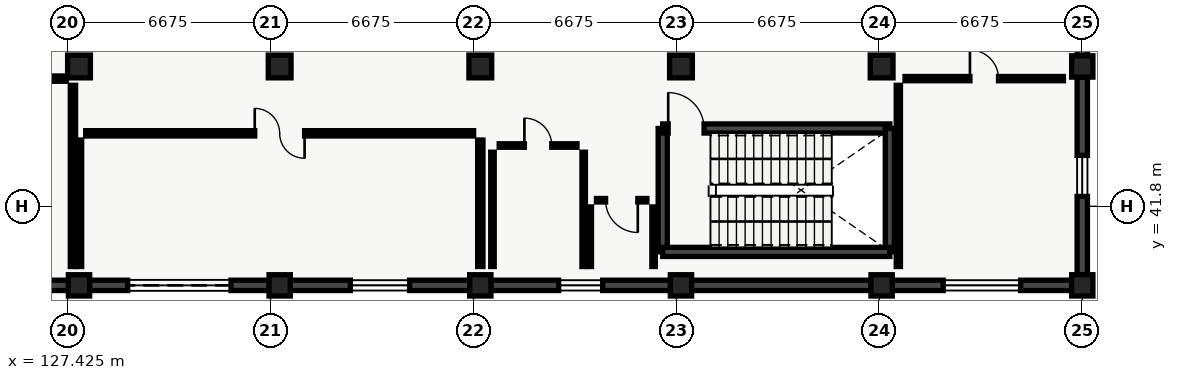
"""IFC4 building model, lengths in metres.
Left out: names, types, materials, properties, quantities, classifications, styles, units other than length and angle.
Written with IfcOpenShell. Run it as: python <this file> out.ifc"""

import sys

from ifc_helpers import new_model, si_unit, direction, frame, frame_2d, origin, origin_2d, place, context, subcontext, project, spatial, rectangle, extrude, element, fill, save


model = new_model("IFC4")
c1 = context("Model", 3, precision=1e-05, world=origin(), true_north=direction((0.0, 1.0)))
c2 = subcontext(c1, "Body", "Model", "MODEL_VIEW")
j1 = project(units=[si_unit("LENGTHUNIT", "METRE"), si_unit("PLANEANGLEUNIT", "RADIAN")], contexts=[c1])
p1 = place(None, origin())
s1 = spatial("IfcSite", under=j1, at=p1, CompositionType="ELEMENT")
p2 = place(p1, origin())
s2 = spatial("IfcBuilding", under=s1, at=p2, CompositionType="ELEMENT")
p3 = place(p2, origin())
s3 = spatial("IfcBuildingStorey", under=s2, at=p3, CompositionType="ELEMENT", Elevation=0.0)
p4 = place(p3, frame((127.8, 39.2, 0.0), z_axis=(0.0, 0.0, 1.0), x_axis=(1.0, 0.0, 0.0)))
e1 = element("IfcColumn", 1, at=p4, inside=s3, PredefinedType="COLUMN", context=c2, shape_type="SweptSolid", body=[
    extrude(rectangle(XDim=0.7, YDim=0.7, at=origin_2d()), origin(), (0.0, 0.0, 1.0), 4.9),
])
p5 = place(p3, frame((127.8, 46.4, 0.0), z_axis=(0.0, 0.0, 1.0), x_axis=(1.0, 0.0, 0.0)))
e2 = element("IfcColumn", 2, at=p5, inside=s3, PredefinedType="COLUMN", context=c2, shape_type="SweptSolid", body=[
    extrude(rectangle(XDim=0.75, YDim=0.75, at=origin_2d()), origin(), (0.0, 0.0, 1.0), 4.9),
])
p6 = place(p3, frame((134.4, 39.2, 0.0), z_axis=(0.0, 0.0, 1.0), x_axis=(1.0, 0.0, 0.0)))
e3 = element("IfcColumn", 3, at=p6, inside=s3, PredefinedType="COLUMN", context=c2, shape_type="SweptSolid", body=[
    extrude(rectangle(XDim=0.7, YDim=0.7, at=origin_2d()), origin(), (0.0, 0.0, 1.0), 4.9),
])
p7 = place(p3, frame((134.4, 46.4, 0.0), z_axis=(0.0, 0.0, 1.0), x_axis=(1.0, 0.0, 0.0)))
e4 = element("IfcColumn", 4, at=p7, inside=s3, PredefinedType="COLUMN", context=c2, shape_type="SweptSolid", body=[
    extrude(rectangle(XDim=0.75, YDim=0.75, at=origin_2d()), origin(), (0.0, 0.0, 1.0), 4.9),
])
p8 = place(p3, frame((141.0, 39.2, 0.0), z_axis=(0.0, 0.0, 1.0), x_axis=(1.0, 0.0, 0.0)))
e5 = element("IfcColumn", 5, at=p8, inside=s3, PredefinedType="COLUMN", context=c2, shape_type="SweptSolid", body=[
    extrude(rectangle(XDim=0.7, YDim=0.7, at=origin_2d()), origin(), (0.0, 0.0, 1.0), 4.9),
])
p9 = place(p3, frame((141.0, 46.4, 0.0), z_axis=(0.0, 0.0, 1.0), x_axis=(1.0, 0.0, 0.0)))
e6 = element("IfcColumn", 6, at=p9, inside=s3, PredefinedType="COLUMN", context=c2, shape_type="SweptSolid", body=[
    extrude(rectangle(XDim=0.75, YDim=0.75, at=origin_2d()), origin(), (0.0, 0.0, 1.0), 4.9),
])
p10 = place(p3, frame((147.6, 39.2, 0.0), z_axis=(0.0, 0.0, 1.0), x_axis=(1.0, 0.0, 0.0)))
e7 = element("IfcColumn", 7, at=p10, inside=s3, PredefinedType="COLUMN", context=c2, shape_type="SweptSolid", body=[
    extrude(rectangle(XDim=0.7, YDim=0.7, at=origin_2d()), origin(), (0.0, 0.0, 1.0), 4.9),
])
p11 = place(p3, frame((147.6, 46.4, 0.0), z_axis=(0.0, 0.0, 1.0), x_axis=(1.0, 0.0, 0.0)))
e8 = element("IfcColumn", 8, at=p11, inside=s3, PredefinedType="COLUMN", context=c2, shape_type="SweptSolid", body=[
    extrude(rectangle(XDim=0.75, YDim=0.75, at=origin_2d()), origin(), (0.0, 0.0, 1.0), 4.9),
])
p12 = place(p3, frame((154.2, 39.2, 0.0), z_axis=(0.0, 0.0, 1.0), x_axis=(1.0, 0.0, 0.0)))
e9 = element("IfcColumn", 9, at=p12, inside=s3, PredefinedType="COLUMN", context=c2, shape_type="SweptSolid", body=[
    extrude(rectangle(XDim=0.7, YDim=0.7, at=origin_2d()), origin(), (0.0, 0.0, 1.0), 4.9),
])
p13 = place(p3, frame((154.2, 46.4, 0.0), z_axis=(0.0, 0.0, 1.0), x_axis=(1.0, 0.0, 0.0)))
e10 = element("IfcColumn", 10, at=p13, inside=s3, PredefinedType="COLUMN", context=c2, shape_type="SweptSolid", body=[
    extrude(rectangle(XDim=0.75, YDim=0.75, at=origin_2d()), origin(), (0.0, 0.0, 1.0), 4.9),
])
for number, where, z_axis, x_axis in (
    (11, (160.8, 39.2, 0.0), (0.0, 0.0, 1.0), (1.0, 0.0, 0.0)),
    (12, (160.8, 46.4, 0.0), (0.0, 0.0, 1.0), (1.0, 0.0, 0.0)),
):
    element("IfcColumn", number, at=place(p3, frame(where, z_axis=z_axis, x_axis=x_axis)), inside=s3, PredefinedType="COLUMN", context=c2, shape_type="SweptSolid", body=[
        extrude(rectangle(XDim=0.7, YDim=0.7, at=origin_2d()), origin(), (0.0, 0.0, 1.0), 4.9),
    ])
p14 = place(p3, frame((160.8, 53.255, 0.0), z_axis=(0.0, 0.0, 1.0), x_axis=(0.0, -1.0, 0.0)))
e13 = element("IfcWall", 13, at=p14, inside=s3, PredefinedType="SOLIDWALL", context=c2, shape_type="SweptSolid", body=[
    extrude(rectangle(XDim=6.51, YDim=0.34, at=frame_2d((3.255, 0.0))), origin(), (0.0, 0.0, 1.0), 4.435),
])
p15 = place(p14, frame((4.06, 0.0, 0.0)))
e14 = element("IfcOpeningElement", 14, at=p15, cuts=e13, PredefinedType="OPENING", context=c2, shape_type="SweptSolid", body=[
    extrude(rectangle(XDim=2.0, YDim=2.25, at=frame_2d((1.0, 1.125))), frame((0.0, 0.17, 0.0), z_axis=(0.0, -1.0, 0.0), x_axis=(1.0, 0.0, 0.0)), (0.0, 0.0, 1.0), 0.34),
])
p16 = place(p3, frame((160.8, 46.055, 0.0), z_axis=(0.0, 0.0, 1.0), x_axis=(0.0, -1.0, 0.0)))
e15 = element("IfcWall", 15, at=p16, inside=s3, PredefinedType="SOLIDWALL", context=c2, shape_type="SweptSolid", body=[
    extrude(rectangle(XDim=6.51, YDim=0.34, at=frame_2d((3.255, 0.0))), origin(), (0.0, 0.0, 1.0), 4.435),
])
p17 = place(p16, frame((2.58, 0.0, 0.95)))
e16 = element("IfcOpeningElement", 16, at=p17, cuts=e15, PredefinedType="OPENING", context=c2, shape_type="SweptSolid", body=[
    extrude(rectangle(XDim=1.35, YDim=1.8, at=frame_2d((0.675, 0.9))), frame((0.0, 0.17, 0.0), z_axis=(0.0, -1.0, 0.0), x_axis=(1.0, 0.0, 0.0)), (0.0, 0.0, 1.0), 0.34),
])
p18 = place(p3, frame((160.455, 39.2, 0.0), z_axis=(0.0, 0.0, 1.0), x_axis=(-1.0, 0.0, 0.0)))
e17 = element("IfcWall", 17, at=p18, inside=s3, PredefinedType="SOLIDWALL", context=c2, shape_type="SweptSolid", body=[
    extrude(rectangle(XDim=5.91, YDim=0.34, at=frame_2d((2.955, 0.0))), origin(), (0.0, 0.0, 1.0), 4.435),
])
p19 = place(p18, frame((1.68, 0.0, 0.95)))
e18 = element("IfcOpeningElement", 18, at=p19, cuts=e17, PredefinedType="OPENING", context=c2, shape_type="SweptSolid", body=[
    extrude(rectangle(XDim=2.55, YDim=1.75, at=frame_2d((1.275, 0.875))), frame((0.0, 0.17, 0.0), z_axis=(0.0, -1.0, 0.0), x_axis=(1.0, 0.0, 0.0)), (0.0, 0.0, 1.0), 0.34),
])
p20 = place(p3, frame((153.855, 39.2, 0.0), z_axis=(0.0, 0.0, 1.0), x_axis=(-1.0, 0.0, 0.0)))
e19 = element("IfcWall", 19, at=p20, inside=s3, PredefinedType="SOLIDWALL", context=c2, shape_type="SweptSolid", body=[
    extrude(rectangle(XDim=5.91, YDim=0.34, at=frame_2d((2.955, 0.0))), origin(), (0.0, 0.0, 1.0), 4.435),
])
p21 = place(p3, frame((147.255, 39.2, 0.0), z_axis=(0.0, 0.0, 1.0), x_axis=(-1.0, 0.0, 0.0)))
e20 = element("IfcWall", 20, at=p21, inside=s3, PredefinedType="SOLIDWALL", context=c2, shape_type="SweptSolid", body=[
    extrude(rectangle(XDim=5.91, YDim=0.34, at=frame_2d((2.955, 0.0))), origin(), (0.0, 0.0, 1.0), 4.435),
])
p22 = place(p21, frame((2.23, 0.0, 0.95)))
e21 = element("IfcOpeningElement", 21, at=p22, cuts=e20, PredefinedType="OPENING", context=c2, shape_type="SweptSolid", body=[
    extrude(rectangle(XDim=1.45, YDim=1.35, at=frame_2d((0.725, 0.675))), frame((0.0, 0.17, 0.0), z_axis=(0.0, -1.0, 0.0), x_axis=(1.0, 0.0, 0.0)), (0.0, 0.0, 1.0), 0.34),
])
p23 = place(p3, frame((140.655, 39.2, 0.0), z_axis=(0.0, 0.0, 1.0), x_axis=(-1.0, 0.0, 0.0)))
e22 = element("IfcWall", 22, at=p23, inside=s3, PredefinedType="SOLIDWALL", context=c2, shape_type="SweptSolid", body=[
    extrude(rectangle(XDim=5.91, YDim=0.34, at=frame_2d((2.955, 0.0))), origin(), (0.0, 0.0, 1.0), 4.435),
])
p24 = place(p23, frame((1.98, 0.0, 0.95)))
e23 = element("IfcOpeningElement", 23, at=p24, cuts=e22, PredefinedType="OPENING", context=c2, shape_type="SweptSolid", body=[
    extrude(rectangle(XDim=1.95, YDim=1.5, at=frame_2d((0.975, 0.75))), frame((0.0, 0.17, 0.0), z_axis=(0.0, -1.0, 0.0), x_axis=(1.0, 0.0, 0.0)), (0.0, 0.0, 1.0), 0.34),
])
p25 = place(p3, frame((134.055, 39.2, 0.0), z_axis=(0.0, 0.0, 1.0), x_axis=(-1.0, 0.0, 0.0)))
e24 = element("IfcWall", 24, at=p25, inside=s3, PredefinedType="SOLIDWALL", context=c2, shape_type="SweptSolid", body=[
    extrude(rectangle(XDim=5.91, YDim=0.34, at=frame_2d((2.955, 0.0))), origin(), (0.0, 0.0, 1.0), 4.435),
])
p26 = place(p25, frame((1.255, 0.0, 0.0)))
e25 = element("IfcOpeningElement", 25, at=p26, cuts=e24, PredefinedType="OPENING", context=c2, shape_type="SweptSolid", body=[
    extrude(rectangle(XDim=3.4, YDim=3.1, at=frame_2d((1.7, 1.55))), frame((0.0, 0.17, 0.0), z_axis=(0.0, -1.0, 0.0), x_axis=(1.0, 0.0, 0.0)), (0.0, 0.0, 1.0), 0.34),
])
p27 = place(p3, frame((127.455, 39.2, 0.0), z_axis=(0.0, 0.0, 1.0), x_axis=(-1.0, 0.0, 0.0)))
e26 = element("IfcWall", 26, at=p27, inside=s3, PredefinedType="SOLIDWALL", context=c2, shape_type="SweptSolid", body=[
    extrude(rectangle(XDim=5.91, YDim=0.34, at=frame_2d((2.955, 0.0))), origin(), (0.0, 0.0, 1.0), 4.435),
])
p28 = place(p27, frame((1.355, 0.0, 0.0)))
e27 = element("IfcOpeningElement", 27, at=p28, cuts=e26, PredefinedType="OPENING", context=c2, shape_type="SweptSolid", body=[
    extrude(rectangle(XDim=3.2, YDim=3.0, at=frame_2d((1.6, 1.5))), frame((0.0, 0.17, 0.0), z_axis=(0.0, -1.0, 0.0), x_axis=(1.0, 0.0, 0.0)), (0.0, 0.0, 1.0), 0.34),
])
p29 = place(p3, frame((147.0, 40.3, 0.0), z_axis=(0.0, 0.0, 1.0), x_axis=(0.0, 1.0, 0.0)))
e28 = element("IfcWall", 28, at=p29, inside=s3, PredefinedType="SHEAR", context=c2, shape_type="SweptSolid", body=[
    extrude(rectangle(XDim=4.06, YDim=0.3, at=frame_2d((2.03, 0.0))), origin(), (0.0, 0.0, 1.0), 4.88),
])
p30 = place(p3, frame((147.0, 44.36, 0.0), z_axis=(0.0, 0.0, 1.0), x_axis=(1.0, 0.0, 0.0)))
e29 = element("IfcWall", 29, at=p30, inside=s3, PredefinedType="SHEAR", context=c2, shape_type="SweptSolid", body=[
    extrude(rectangle(XDim=7.47, YDim=0.3, at=frame_2d((3.735, 0.0))), origin(), (0.0, 0.0, 1.0), 4.88),
])
p31 = place(p30, frame((0.18, 0.0, 0.0)))
e30 = element("IfcOpeningElement", 30, at=p31, cuts=e29, PredefinedType="OPENING", context=c2, shape_type="SweptSolid", body=[
    extrude(rectangle(XDim=1.18, YDim=2.15, at=frame_2d((0.59, 1.075))), frame((0.0, 0.15, 0.0), z_axis=(0.0, -1.0, 0.0), x_axis=(1.0, 0.0, 0.0)), (0.0, 0.0, 1.0), 0.3),
])
p32 = place(p3, frame((154.47, 44.36, 0.0), z_axis=(0.0, 0.0, 1.0), x_axis=(0.0, -1.0, 0.0)))
e31 = element("IfcWall", 31, at=p32, inside=s3, PredefinedType="SHEAR", context=c2, shape_type="SweptSolid", body=[
    extrude(rectangle(XDim=4.06, YDim=0.3, at=frame_2d((2.03, 0.0))), origin(), (0.0, 0.0, 1.0), 4.88),
])
p33 = place(p3, frame((154.47, 40.3, 0.0), z_axis=(0.0, 0.0, 1.0), x_axis=(-1.0, 0.0, 0.0)))
e32 = element("IfcWall", 32, at=p33, inside=s3, PredefinedType="SHEAR", context=c2, shape_type="SweptSolid", body=[
    extrude(rectangle(XDim=7.47, YDim=0.3, at=frame_2d((3.735, 0.0))), origin(), (0.0, 0.0, 1.0), 4.88),
])
p34 = place(p3, frame((144.4, 39.82, 0.0), z_axis=(0.0, 0.0, 1.0), x_axis=(0.0, 1.0, 0.0)))
e33 = element("IfcWall", 33, at=p34, inside=s3, PredefinedType="PARTITIONING", context=c2, shape_type="SweptSolid", body=[
    extrude(rectangle(XDim=3.76, YDim=0.115, at=frame_2d((1.88, 0.0))), origin(), (0.0, 0.0, 1.0), 4.55),
])
p35 = place(p3, frame((144.18, 43.8, 0.0), z_axis=(0.0, 0.0, 1.0), x_axis=(-1.0, 0.0, 0.0)))
e34 = element("IfcWall", 34, at=p35, inside=s3, PredefinedType="PARTITIONING", context=c2, shape_type="SweptSolid", body=[
    extrude(rectangle(XDim=2.56, YDim=0.115, at=frame_2d((1.28, 0.0))), origin(), (0.0, 0.0, 1.0), 4.55),
])
p36 = place(p35, frame((0.83, 0.0, 0.0)))
e35 = element("IfcOpeningElement", 35, at=p36, cuts=e34, PredefinedType="OPENING", context=c2, shape_type="SweptSolid", body=[
    extrude(rectangle(XDim=0.9, YDim=2.1, at=frame_2d((0.45, 1.05))), frame((0.0, 0.058, 0.0), z_axis=(0.0, -1.0, 0.0), x_axis=(1.0, 0.0, 0.0)), (0.0, 0.0, 1.0), 0.115),
])
p37 = place(p3, frame((141.4, 43.58, 0.0), z_axis=(0.0, 0.0, 1.0), x_axis=(0.0, -1.0, 0.0)))
e36 = element("IfcWall", 36, at=p37, inside=s3, PredefinedType="PARTITIONING", context=c2, shape_type="SweptSolid", body=[
    extrude(rectangle(XDim=3.76, YDim=0.115, at=frame_2d((1.88, 0.0))), origin(), (0.0, 0.0, 1.0), 4.55),
])
p38 = place(p3, frame((146.7, 39.82, 0.0), z_axis=(0.0, 0.0, 1.0), x_axis=(0.0, 1.0, 0.0)))
e37 = element("IfcWall", 37, at=p38, inside=s3, PredefinedType="PARTITIONING", context=c2, shape_type="SweptSolid", body=[
    extrude(rectangle(XDim=1.96, YDim=0.115, at=frame_2d((0.98, 0.0))), origin(), (0.0, 0.0, 1.0), 4.55),
])
p39 = place(p3, frame((146.48, 42.0, 0.0), z_axis=(0.0, 0.0, 1.0), x_axis=(-1.0, 0.0, 0.0)))
e38 = element("IfcWall", 38, at=p39, inside=s3, PredefinedType="PARTITIONING", context=c2, shape_type="SweptSolid", body=[
    extrude(rectangle(XDim=1.66, YDim=0.115, at=frame_2d((0.83, 0.0))), origin(), (0.0, 0.0, 1.0), 4.55),
])
p40 = place(p39, frame((0.3, 0.0, 0.0)))
e39 = element("IfcOpeningElement", 39, at=p40, cuts=e38, PredefinedType="OPENING", context=c2, shape_type="SweptSolid", body=[
    extrude(rectangle(XDim=1.06, YDim=2.12, at=frame_2d((0.53, 1.06))), frame((0.0, 0.058, 0.0), z_axis=(0.0, -1.0, 0.0), x_axis=(1.0, 0.0, 0.0)), (0.0, 0.0, 1.0), 0.115),
])
p41 = place(p3, frame((144.6, 41.78, 0.0), z_axis=(0.0, 0.0, 1.0), x_axis=(0.0, -1.0, 0.0)))
e40 = element("IfcWall", 40, at=p41, inside=s3, PredefinedType="PARTITIONING", context=c2, shape_type="SweptSolid", body=[
    extrude(rectangle(XDim=1.96, YDim=0.115, at=frame_2d((0.98, 0.0))), origin(), (0.0, 0.0, 1.0), 4.55),
])
p42 = place(p3, frame((127.6, 39.82, 0.0), z_axis=(0.0, 0.0, 1.0), x_axis=(0.0, 1.0, 0.0)))
e41 = element("IfcWall", 41, at=p42, inside=s3, PredefinedType="SOLIDWALL", context=c2, shape_type="SweptSolid", body=[
    extrude(rectangle(XDim=5.96, YDim=0.175, at=frame_2d((2.98, 0.0))), origin(), (0.0, 0.0, 1.0), 4.235),
])
p43 = place(p3, frame((127.38, 46.0, 0.0), z_axis=(0.0, 0.0, 1.0), x_axis=(-1.0, 0.0, 0.0)))
e42 = element("IfcWall", 42, at=p43, inside=s3, PredefinedType="SOLIDWALL", context=c2, shape_type="SweptSolid", body=[
    extrude(rectangle(XDim=12.16, YDim=0.175, at=frame_2d((6.08, 0.0))), origin(), (0.0, 0.0, 1.0), 4.55),
])
p44 = place(p43, frame((7.364, 0.0, 0.0)))
e43 = element("IfcOpeningElement", 43, at=p44, cuts=e42, PredefinedType="OPENING", context=c2, shape_type="SweptSolid", body=[
    extrude(rectangle(XDim=1.64, YDim=2.2, at=frame_2d((0.82, 1.1))), frame((0.0, 0.087, 0.0), z_axis=(0.0, -1.0, 0.0), x_axis=(1.0, 0.0, 0.0)), (0.0, 0.0, 1.0), 0.175),
])
p45 = place(p3, frame((141.0, 39.82, 0.0), z_axis=(0.0, 0.0, 1.0), x_axis=(0.0, 1.0, 0.0)))
e44 = element("IfcWall", 44, at=p45, inside=s3, PredefinedType="SOLIDWALL", context=c2, shape_type="SweptSolid", body=[
    extrude(rectangle(XDim=4.16, YDim=0.175, at=frame_2d((2.08, 0.0))), origin(), (0.0, 0.0, 1.0), 4.235),
])
p46 = place(p3, frame((140.78, 44.2, 0.0), z_axis=(0.0, 0.0, 1.0), x_axis=(-1.0, 0.0, 0.0)))
e45 = element("IfcWall", 45, at=p46, inside=s3, PredefinedType="SOLIDWALL", context=c2, shape_type="SweptSolid", body=[
    extrude(rectangle(XDim=12.76, YDim=0.175, at=frame_2d((6.38, 0.0))), origin(), (0.0, 0.0, 1.0), 4.485),
])
p47 = place(p46, frame((5.56, 0.0, 0.0)))
e46 = element("IfcOpeningElement", 46, at=p47, cuts=e45, PredefinedType="OPENING", context=c2, shape_type="SweptSolid", body=[
    extrude(rectangle(XDim=1.64, YDim=2.2, at=frame_2d((0.82, 1.1))), frame((0.0, 0.087, 0.0), z_axis=(0.0, -1.0, 0.0), x_axis=(1.0, 0.0, 0.0)), (0.0, 0.0, 1.0), 0.175),
])
p48 = place(p3, frame((127.8, 43.98, 0.0), z_axis=(0.0, 0.0, 1.0), x_axis=(0.0, -1.0, 0.0)))
e47 = element("IfcWall", 47, at=p48, inside=s3, PredefinedType="SOLIDWALL", context=c2, shape_type="SweptSolid", body=[
    extrude(rectangle(XDim=4.16, YDim=0.175, at=frame_2d((2.08, 0.0))), origin(), (0.0, 0.0, 1.0), 4.235),
])
p49 = place(p3, frame((160.18, 46.0, 0.0), z_axis=(0.0, 0.0, 1.0), x_axis=(-1.0, 0.0, 0.0)))
e48 = element("IfcWall", 48, at=p49, inside=s3, PredefinedType="PARTITIONING", context=c2, shape_type="SweptSolid", body=[
    extrude(rectangle(XDim=5.21, YDim=0.14, at=frame_2d((2.605, 0.0))), origin(), (0.0, 0.0, 1.0), 4.55),
])
p50 = place(p49, frame((2.135, 0.0, 0.0)))
e49 = element("IfcOpeningElement", 49, at=p50, cuts=e48, PredefinedType="OPENING", context=c2, shape_type="SweptSolid", body=[
    extrude(rectangle(XDim=0.94, YDim=2.12, at=frame_2d((0.47, 1.06))), frame((0.0, 0.07, 0.0), z_axis=(0.0, -1.0, 0.0), x_axis=(1.0, 0.0, 0.0)), (0.0, 0.0, 1.0), 0.14),
])
p51 = place(p3, frame((154.75, 45.78, 0.0), z_axis=(0.0, 0.0, 1.0), x_axis=(0.0, -1.0, 0.0)))
e50 = element("IfcWall", 50, at=p51, inside=s3, PredefinedType="PARTITIONING", context=c2, shape_type="SweptSolid", body=[
    extrude(rectangle(XDim=5.96, YDim=0.14, at=frame_2d((2.98, 0.0))), origin(), (0.0, 0.0, 1.0), 4.55),
])
p52 = place(p17, origin())
e51 = element("IfcWindow", 51, at=p52, inside=s3, PartitioningType="SINGLE_PANEL", PredefinedType="WINDOW", context=c2, shape_type="SweptSolid", body=[
    extrude(rectangle(XDim=1.35, YDim=1.8, at=frame_2d((0.675, 0.9))), frame((0.0, 0.03, 0.0), z_axis=(0.0, -1.0, 0.0), x_axis=(1.0, 0.0, 0.0)), (0.0, 0.0, 1.0), 0.06),
])
fill(e16, e51)
p53 = place(p19, origin())
e52 = element("IfcWindow", 52, at=p53, inside=s3, PartitioningType="SINGLE_PANEL", PredefinedType="WINDOW", context=c2, shape_type="SweptSolid", body=[
    extrude(rectangle(XDim=2.55, YDim=1.75, at=frame_2d((1.275, 0.875))), frame((0.0, 0.03, 0.0), z_axis=(0.0, -1.0, 0.0), x_axis=(1.0, 0.0, 0.0)), (0.0, 0.0, 1.0), 0.06),
])
fill(e18, e52)
p54 = place(p22, origin())
e53 = element("IfcWindow", 53, at=p54, inside=s3, PartitioningType="SINGLE_PANEL", PredefinedType="WINDOW", context=c2, shape_type="SweptSolid", body=[
    extrude(rectangle(XDim=1.45, YDim=1.35, at=frame_2d((0.725, 0.675))), frame((0.0, 0.03, 0.0), z_axis=(0.0, -1.0, 0.0), x_axis=(1.0, 0.0, 0.0)), (0.0, 0.0, 1.0), 0.06),
])
fill(e21, e53)
p55 = place(p24, origin())
e54 = element("IfcWindow", 54, at=p55, inside=s3, PartitioningType="SINGLE_PANEL", PredefinedType="WINDOW", context=c2, shape_type="SweptSolid", body=[
    extrude(rectangle(XDim=1.95, YDim=1.5, at=frame_2d((0.975, 0.75))), frame((0.0, 0.03, 0.0), z_axis=(0.0, -1.0, 0.0), x_axis=(1.0, 0.0, 0.0)), (0.0, 0.0, 1.0), 0.06),
])
fill(e23, e54)
p56 = place(p26, origin())
e55 = element("IfcDoor", 55, at=p56, inside=s3, OperationType="ROLLINGUP", PredefinedType="GATE", context=c2, shape_type="SweptSolid", body=[
    extrude(rectangle(XDim=3.4, YDim=3.1, at=frame_2d((1.7, 1.55))), frame((0.0, 0.025, 0.0), z_axis=(0.0, -1.0, 0.0), x_axis=(1.0, 0.0, 0.0)), (0.0, 0.0, 1.0), 0.05),
])
fill(e25, e55)
p57 = place(p31, origin())
e56 = element("IfcDoor", 56, at=p57, inside=s3, OperationType="SINGLE_SWING_LEFT", PredefinedType="DOOR", context=c2, shape_type="SweptSolid", body=[
    extrude(rectangle(XDim=1.18, YDim=2.15, at=frame_2d((0.59, 1.075))), frame((0.0, 0.025, 0.0), z_axis=(0.0, -1.0, 0.0), x_axis=(1.0, 0.0, 0.0)), (0.0, 0.0, 1.0), 0.05),
])
fill(e30, e56)
p58 = place(p36, origin())
e57 = element("IfcDoor", 57, at=p58, inside=s3, OperationType="SINGLE_SWING_RIGHT", PredefinedType="DOOR", context=c2, shape_type="SweptSolid", body=[
    extrude(rectangle(XDim=0.9, YDim=2.1, at=frame_2d((0.45, 1.05))), frame((0.0, 0.025, 0.0), z_axis=(0.0, -1.0, 0.0), x_axis=(1.0, 0.0, 0.0)), (0.0, 0.0, 1.0), 0.05),
])
fill(e35, e57)
p59 = place(p40, origin())
e58 = element("IfcDoor", 58, at=p59, inside=s3, OperationType="SINGLE_SWING_LEFT", PredefinedType="DOOR", context=c2, shape_type="SweptSolid", body=[
    extrude(rectangle(XDim=1.06, YDim=2.12, at=frame_2d((0.53, 1.06))), frame((0.0, 0.025, 0.0), z_axis=(0.0, -1.0, 0.0), x_axis=(1.0, 0.0, 0.0)), (0.0, 0.0, 1.0), 0.05),
])
fill(e39, e58)
p60 = place(p47, origin())
e59 = element("IfcDoor", 59, at=p60, inside=s3, OperationType="DOUBLE_DOOR_SINGLE_SWING", PredefinedType="DOOR", context=c2, shape_type="SweptSolid", body=[
    extrude(rectangle(XDim=1.64, YDim=2.2, at=frame_2d((0.82, 1.1))), frame((0.0, 0.025, 0.0), z_axis=(0.0, -1.0, 0.0), x_axis=(1.0, 0.0, 0.0)), (0.0, 0.0, 1.0), 0.05),
])
fill(e46, e59)
p61 = place(p50, origin())
e60 = element("IfcDoor", 60, at=p61, inside=s3, OperationType="SINGLE_SWING_RIGHT", PredefinedType="DOOR", context=c2, shape_type="SweptSolid", body=[
    extrude(rectangle(XDim=0.94, YDim=2.12, at=frame_2d((0.47, 1.06))), frame((0.0, 0.025, 0.0), z_axis=(0.0, -1.0, 0.0), x_axis=(1.0, 0.0, 0.0)), (0.0, 0.0, 1.0), 0.05),
])
fill(e49, e60)
save(model, sys.argv[1])
